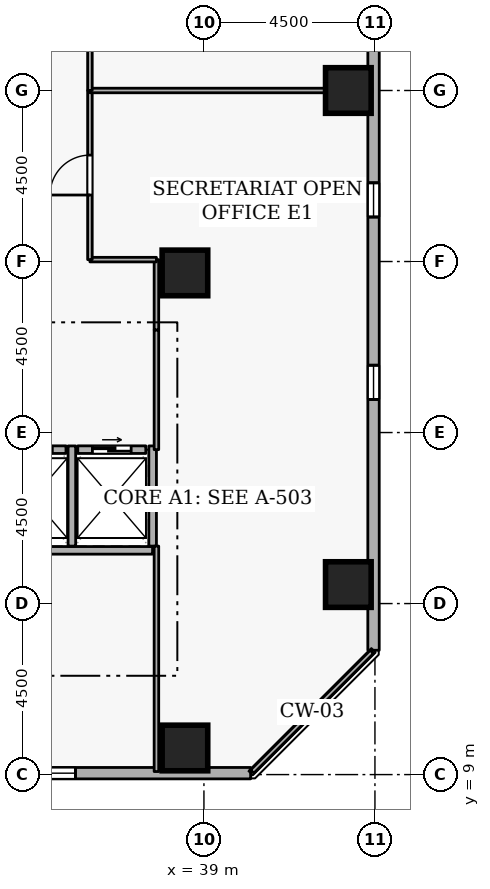
"""IFC4 building model, lengths in metres.
Left out: names, types, materials, properties, quantities, classifications, styles, units other than length and angle.
Written with IfcOpenShell. Run it as: python <this file> out.ifc"""

import sys

from ifc_helpers import new_model, si_unit, direction, frame, frame_2d, origin, origin_2d, place, context, subcontext, project, spatial, rectangle, extrude, element, fill, save


model = new_model("IFC4")
c1 = context("Model", 3, precision=1e-05, world=origin(), true_north=direction((0.0, 1.0)))
c2 = subcontext(c1, "Body", "Model", "MODEL_VIEW")
j1 = project(units=[si_unit("LENGTHUNIT", "METRE"), si_unit("PLANEANGLEUNIT", "RADIAN")], contexts=[c1])
p1 = place(None, origin())
s1 = spatial("IfcSite", under=j1, at=p1, CompositionType="ELEMENT")
p2 = place(p1, origin())
s2 = spatial("IfcBuilding", under=s1, at=p2, CompositionType="ELEMENT")
p3 = place(p2, frame((0.0, 0.0, 108.9)))
s3 = spatial("IfcBuildingStorey", under=s2, at=p3, CompositionType="ELEMENT", Elevation=108.9)
for number, where, z_axis, x_axis in (
    (1, (38.5, 9.7, 0.0), (0.0, 0.0, 1.0), (1.0, 0.0, 0.0)),
    (2, (42.8, 14.0, 0.0), (0.0, 0.0, 1.0), (1.0, 0.0, 0.0)),
    (3, (42.8, 27.0, 0.0), (0.0, 0.0, 1.0), (1.0, 0.0, 0.0)),
    (4, (38.5, 22.2, 0.0), (0.0, 0.0, 1.0), (1.0, 0.0, 0.0)),
):
    element("IfcColumn", number, at=place(p3, frame(where, z_axis=z_axis, x_axis=x_axis)), inside=s3, PredefinedType="COLUMN", context=c2, shape_type="SweptSolid", body=[
        extrude(rectangle(XDim=1.2, YDim=1.2, at=origin_2d()), origin(), (0.0, 0.0, 1.0), 3.6),
    ])
p4 = place(p3, frame((4.119, 9.035, 0.0), z_axis=(0.0, 0.0, 1.0), x_axis=(0.999999998537, 5.4088042e-05, 0.0)))
e5 = element("IfcWall", 5, at=p4, inside=s3, PredefinedType="STANDARD", context=c2, shape_type="SweptSolid", body=[
    extrude(rectangle(XDim=36.11, YDim=0.3, at=frame_2d((18.055, 0.0))), origin(), (0.0, 0.0, 1.0), 2.7),
])
p5 = place(p4, frame((1.8, 0.0, 0.72)))
e6 = element("IfcOpeningElement", 6, at=p5, cuts=e5, PredefinedType="OPENING", context=c2, shape_type="SweptSolid", body=[
    extrude(rectangle(XDim=0.9, YDim=1.75, at=frame_2d((0.45, 0.875))), frame((0.0, 0.16, 0.0), z_axis=(0.0, -1.0, 0.0), x_axis=(1.0, 0.0, 0.0)), (0.0, 0.0, 1.0), 0.32),
])
p6 = place(p4, frame((11.4, 0.0, 0.72)))
e7 = element("IfcOpeningElement", 7, at=p6, cuts=e5, PredefinedType="OPENING", context=c2, shape_type="SweptSolid", body=[
    extrude(rectangle(XDim=0.9, YDim=1.75, at=frame_2d((0.45, 0.875))), frame((0.0, 0.16, 0.0), z_axis=(0.0, -1.0, 0.0), x_axis=(1.0, 0.0, 0.0)), (0.0, 0.0, 1.0), 0.32),
])
p7 = place(p4, frame((16.2, 0.0, 0.72)))
e8 = element("IfcOpeningElement", 8, at=p7, cuts=e5, PredefinedType="OPENING", context=c2, shape_type="SweptSolid", body=[
    extrude(rectangle(XDim=0.9, YDim=1.75, at=frame_2d((0.45, 0.875))), frame((0.0, 0.16, 0.0), z_axis=(0.0, -1.0, 0.0), x_axis=(1.0, 0.0, 0.0)), (0.0, 0.0, 1.0), 0.32),
])
p8 = place(p4, frame((25.8, 0.0, 0.72)))
e9 = element("IfcOpeningElement", 9, at=p8, cuts=e5, PredefinedType="OPENING", context=c2, shape_type="SweptSolid", body=[
    extrude(rectangle(XDim=0.9, YDim=1.75, at=frame_2d((0.45, 0.875))), frame((0.0, 0.16, 0.0), z_axis=(0.0, -1.0, 0.0), x_axis=(1.0, 0.0, 0.0)), (0.0, 0.0, 1.0), 0.32),
])
p9 = place(p4, frame((30.6, 0.0, 0.72)))
e10 = element("IfcOpeningElement", 10, at=p9, cuts=e5, PredefinedType="OPENING", context=c2, shape_type="SweptSolid", body=[
    extrude(rectangle(XDim=0.9, YDim=1.75, at=frame_2d((0.45, 0.875))), frame((0.0, 0.16, 0.0), z_axis=(0.0, -1.0, 0.0), x_axis=(1.0, 0.0, 0.0)), (0.0, 0.0, 1.0), 0.32),
])
p10 = place(p3, frame((43.463, 12.271, 0.0), z_axis=(0.0, 0.0, 1.0), x_axis=(5.4088042e-05, 0.999999998537, 0.0)))
e11 = element("IfcWall", 11, at=p10, inside=s3, PredefinedType="STANDARD", context=c2, shape_type="SweptSolid", body=[
    extrude(rectangle(XDim=36.11, YDim=0.3, at=frame_2d((18.055, 0.0))), origin(), (0.0, 0.0, 1.0), 2.7),
])
p11 = place(p10, frame((6.6, 0.0, 0.72)))
e12 = element("IfcOpeningElement", 12, at=p11, cuts=e11, PredefinedType="OPENING", context=c2, shape_type="SweptSolid", body=[
    extrude(rectangle(XDim=0.9, YDim=1.75, at=frame_2d((0.45, 0.875))), frame((0.0, 0.16, 0.0), z_axis=(0.0, -1.0, 0.0), x_axis=(1.0, 0.0, 0.0)), (0.0, 0.0, 1.0), 0.32),
])
p12 = place(p10, frame((11.4, 0.0, 0.72)))
e13 = element("IfcOpeningElement", 13, at=p12, cuts=e11, PredefinedType="OPENING", context=c2, shape_type="SweptSolid", body=[
    extrude(rectangle(XDim=0.9, YDim=1.75, at=frame_2d((0.45, 0.875))), frame((0.0, 0.16, 0.0), z_axis=(0.0, -1.0, 0.0), x_axis=(1.0, 0.0, 0.0)), (0.0, 0.0, 1.0), 0.32),
])
p13 = place(p10, frame((16.2, 0.0, 0.72)))
e14 = element("IfcOpeningElement", 14, at=p13, cuts=e11, PredefinedType="OPENING", context=c2, shape_type="SweptSolid", body=[
    extrude(rectangle(XDim=0.9, YDim=1.75, at=frame_2d((0.45, 0.875))), frame((0.0, 0.16, 0.0), z_axis=(0.0, -1.0, 0.0), x_axis=(1.0, 0.0, 0.0)), (0.0, 0.0, 1.0), 0.32),
])
p14 = place(p10, frame((21.0, 0.0, 0.72)))
e15 = element("IfcOpeningElement", 15, at=p14, cuts=e11, PredefinedType="OPENING", context=c2, shape_type="SweptSolid", body=[
    extrude(rectangle(XDim=0.9, YDim=1.75, at=frame_2d((0.45, 0.875))), frame((0.0, 0.16, 0.0), z_axis=(0.0, -1.0, 0.0), x_axis=(1.0, 0.0, 0.0)), (0.0, 0.0, 1.0), 0.32),
])
p15 = place(p10, frame((30.6, 0.0, 0.72)))
e16 = element("IfcOpeningElement", 16, at=p15, cuts=e11, PredefinedType="OPENING", context=c2, shape_type="SweptSolid", body=[
    extrude(rectangle(XDim=0.9, YDim=1.75, at=frame_2d((0.45, 0.875))), frame((0.0, 0.16, 0.0), z_axis=(0.0, -1.0, 0.0), x_axis=(1.0, 0.0, 0.0)), (0.0, 0.0, 1.0), 0.32),
])
p16 = place(p3, frame((33.63, 17.55, 0.0), z_axis=(0.0, 0.0, 1.0), x_axis=(1.0, 0.0, 0.0)))
e17 = element("IfcWall", 17, at=p16, inside=s3, PredefinedType="STANDARD", context=c2, shape_type="SweptSolid", body=[
    extrude(rectangle(XDim=1.74, YDim=0.2, at=frame_2d((0.87, 0.0))), origin(), (0.0, 0.0, 1.0), 3.34),
])
p17 = place(p16, frame((0.36, 0.0, 0.0)))
e18 = element("IfcOpeningElement", 18, at=p17, cuts=e17, PredefinedType="OPENING", context=c2, shape_type="SweptSolid", body=[
    extrude(rectangle(XDim=1.02, YDim=2.06, at=frame_2d((0.51, 1.03))), frame((0.0, 0.11, 0.0), z_axis=(0.0, -1.0, 0.0), x_axis=(1.0, 0.0, 0.0)), (0.0, 0.0, 1.0), 0.22),
])
p18 = place(p3, frame((35.68, 17.55, 0.0), z_axis=(0.0, 0.0, 1.0), x_axis=(1.0, 0.0, 0.0)))
e19 = element("IfcWall", 19, at=p18, inside=s3, PredefinedType="STANDARD", context=c2, shape_type="SweptSolid", body=[
    extrude(rectangle(XDim=1.79, YDim=0.2, at=frame_2d((0.895, 0.0))), origin(), (0.0, 0.0, 1.0), 3.34),
])
p19 = place(p18, frame((0.385, 0.0, 0.0)))
e20 = element("IfcOpeningElement", 20, at=p19, cuts=e19, PredefinedType="OPENING", context=c2, shape_type="SweptSolid", body=[
    extrude(rectangle(XDim=1.02, YDim=2.06, at=frame_2d((0.51, 1.03))), frame((0.0, 0.11, 0.0), z_axis=(0.0, -1.0, 0.0), x_axis=(1.0, 0.0, 0.0)), (0.0, 0.0, 1.0), 0.22),
])
p20 = place(p3, frame((33.452, 14.9, 0.0), z_axis=(0.0, 0.0, 1.0), x_axis=(1.0, 0.0, 0.0)))
e21 = element("IfcWall", 21, at=p20, inside=s3, PredefinedType="STANDARD", context=c2, shape_type="SweptSolid", body=[
    extrude(rectangle(XDim=4.196, YDim=0.2, at=frame_2d((2.098, 0.0))), origin(), (0.0, 0.0, 1.0), 3.34),
])
for number, where, z_axis, x_axis in (
    (22, (35.525, 15.012, 0.0), (0.0, 0.0, 1.0), (0.0, 1.0, 0.0)),
    (23, (37.65, 15.012, 0.0), (0.0, 0.0, 1.0), (0.0, 1.0, 0.0)),
):
    element("IfcWall", number, at=place(p3, frame(where, z_axis=z_axis, x_axis=x_axis)), inside=s3, PredefinedType="STANDARD", context=c2, shape_type="SweptSolid", body=[
        extrude(rectangle(XDim=2.636, YDim=0.2, at=frame_2d((1.318, 0.0))), origin(), (0.0, 0.0, 1.0), 3.34),
    ])
p21 = place(p3, frame((37.75, 17.55, 0.0), z_axis=(0.0, 0.0, 1.0), x_axis=(0.0, 1.0, 0.0)))
e24 = element("IfcWall", 24, at=p21, inside=s3, PredefinedType="PARTITIONING", context=c2, shape_type="SweptSolid", body=[
    extrude(rectangle(XDim=3.15, YDim=0.12, at=frame_2d((1.575, 0.0))), origin(), (0.0, 0.0, 1.0), 3.34),
])
p22 = place(p3, frame((37.75, 20.7, 0.0), z_axis=(0.0, 0.0, 1.0), x_axis=(0.0, 1.0, 0.0)))
e25 = element("IfcWall", 25, at=p22, inside=s3, PredefinedType="PARTITIONING", context=c2, shape_type="SweptSolid", body=[
    extrude(rectangle(XDim=1.85, YDim=0.12, at=frame_2d((0.925, 0.0))), origin(), (0.0, 0.0, 1.0), 3.34),
])
p23 = place(p3, frame((37.75, 22.55, 0.0), z_axis=(0.0, 0.0, 1.0), x_axis=(-1.0, 0.0, 0.0)))
e26 = element("IfcWall", 26, at=p23, inside=s3, PredefinedType="PARTITIONING", context=c2, shape_type="SweptSolid", body=[
    extrude(rectangle(XDim=1.75, YDim=0.12, at=frame_2d((0.875, 0.0))), origin(), (0.0, 0.0, 1.0), 3.34),
])
p24 = place(p3, frame((36.0, 22.55, 0.0), z_axis=(0.0, 0.0, 1.0), x_axis=(0.0, 1.0, 0.0)))
e27 = element("IfcWall", 27, at=p24, inside=s3, PredefinedType="PARTITIONING", context=c2, shape_type="SweptSolid", body=[
    extrude(rectangle(XDim=4.45, YDim=0.12, at=frame_2d((2.225, 0.0))), origin(), (0.0, 0.0, 1.0), 3.34),
])
p25 = place(p24, frame((1.7, 0.0, 0.0)))
e28 = element("IfcOpeningElement", 28, at=p25, cuts=e27, PredefinedType="OPENING", context=c2, shape_type="SweptSolid", body=[
    extrude(rectangle(XDim=1.05, YDim=2.1, at=frame_2d((0.525, 1.05))), frame((0.0, 0.07, 0.0), z_axis=(0.0, -1.0, 0.0), x_axis=(1.0, 0.0, 0.0)), (0.0, 0.0, 1.0), 0.14),
])
p26 = place(p3, frame((36.0, 27.0, 0.0), z_axis=(0.0, 0.0, 1.0), x_axis=(1.0, 0.0, 0.0)))
e29 = element("IfcWall", 29, at=p26, inside=s3, PredefinedType="PARTITIONING", context=c2, shape_type="SweptSolid", body=[
    extrude(rectangle(XDim=7.42, YDim=0.12, at=frame_2d((3.71, 0.0))), origin(), (0.0, 0.0, 1.0), 2.882),
])
p27 = place(p3, frame((43.42, 12.229, 0.0), z_axis=(0.0, 0.0, 1.0), x_axis=(-0.707106781187, -0.707106781187, 0.0)))
e30 = element("IfcWall", 30, at=p27, inside=s3, PredefinedType="PARTITIONING", context=c2, shape_type="SweptSolid", body=[
    extrude(rectangle(XDim=4.454, YDim=0.12, at=frame_2d((2.227, 0.0))), origin(), (0.0, 0.0, 1.0), 3.34),
])
p28 = place(p3, frame((37.75, 9.08, 0.0), z_axis=(0.0, 0.0, 1.0), x_axis=(0.0, 1.0, 0.0)))
e31 = element("IfcWall", 31, at=p28, inside=s3, PredefinedType="PARTITIONING", context=c2, shape_type="SweptSolid", body=[
    extrude(rectangle(XDim=5.932, YDim=0.12, at=frame_2d((2.966, 0.0))), origin(), (0.0, 0.0, 1.0), 3.34),
])
p29 = place(p3, frame((36.0, 27.0, 0.0), z_axis=(0.0, 0.0, 1.0), x_axis=(0.0, 1.0, 0.0)))
e32 = element("IfcWall", 32, at=p29, inside=s3, PredefinedType="PARTITIONING", context=c2, shape_type="SweptSolid", body=[
    extrude(rectangle(XDim=3.15, YDim=0.12, at=frame_2d((1.575, 0.0))), origin(), (0.0, 0.0, 1.0), 3.34),
])
p30 = place(p29, frame((1.1, 0.0, 0.0)))
e33 = element("IfcOpeningElement", 33, at=p30, cuts=e32, PredefinedType="OPENING", context=c2, shape_type="SweptSolid", body=[
    extrude(rectangle(XDim=0.95, YDim=2.1, at=frame_2d((0.475, 1.05))), frame((0.0, 0.07, 0.0), z_axis=(0.0, -1.0, 0.0), x_axis=(1.0, 0.0, 0.0)), (0.0, 0.0, 1.0), 0.14),
])
p31 = place(p9, origin())
e34 = element("IfcWindow", 34, at=p31, inside=s3, PartitioningType="SINGLE_PANEL", PredefinedType="WINDOW", context=c2, shape_type="SweptSolid", body=[
    extrude(rectangle(XDim=0.9, YDim=1.75, at=frame_2d((0.45, 0.875))), frame((0.0, 0.03, 0.0), z_axis=(0.0, -1.0, 0.0), x_axis=(1.0, 0.0, 0.0)), (0.0, 0.0, 1.0), 0.06),
])
fill(e10, e34)
p32 = place(p11, origin())
e35 = element("IfcWindow", 35, at=p32, inside=s3, PartitioningType="SINGLE_PANEL", PredefinedType="WINDOW", context=c2, shape_type="SweptSolid", body=[
    extrude(rectangle(XDim=0.9, YDim=1.75, at=frame_2d((0.45, 0.875))), frame((0.0, 0.03, 0.0), z_axis=(0.0, -1.0, 0.0), x_axis=(1.0, 0.0, 0.0)), (0.0, 0.0, 1.0), 0.06),
])
fill(e12, e35)
p33 = place(p12, origin())
e36 = element("IfcWindow", 36, at=p33, inside=s3, PartitioningType="SINGLE_PANEL", PredefinedType="WINDOW", context=c2, shape_type="SweptSolid", body=[
    extrude(rectangle(XDim=0.9, YDim=1.75, at=frame_2d((0.45, 0.875))), frame((0.0, 0.03, 0.0), z_axis=(0.0, -1.0, 0.0), x_axis=(1.0, 0.0, 0.0)), (0.0, 0.0, 1.0), 0.06),
])
fill(e13, e36)
p34 = place(p17, origin())
e37 = element("IfcDoor", 37, at=p34, inside=s3, OperationType="SLIDING_TO_LEFT", PredefinedType="DOOR", context=c2, shape_type="SweptSolid", body=[
    extrude(rectangle(XDim=1.02, YDim=2.06, at=frame_2d((0.51, 1.03))), frame((0.0, 0.025, 0.0), z_axis=(0.0, -1.0, 0.0), x_axis=(1.0, 0.0, 0.0)), (0.0, 0.0, 1.0), 0.05),
])
fill(e18, e37)
p35 = place(p19, origin())
e38 = element("IfcDoor", 38, at=p35, inside=s3, OperationType="SLIDING_TO_LEFT", PredefinedType="DOOR", context=c2, shape_type="SweptSolid", body=[
    extrude(rectangle(XDim=1.02, YDim=2.06, at=frame_2d((0.51, 1.03))), frame((0.0, 0.025, 0.0), z_axis=(0.0, -1.0, 0.0), x_axis=(1.0, 0.0, 0.0)), (0.0, 0.0, 1.0), 0.05),
])
fill(e20, e38)
p36 = place(p25, origin())
e39 = element("IfcDoor", 39, at=p36, inside=s3, OperationType="SINGLE_SWING_LEFT", PredefinedType="DOOR", context=c2, shape_type="SweptSolid", body=[
    extrude(rectangle(XDim=1.05, YDim=2.1, at=frame_2d((0.525, 1.05))), frame((0.0, 0.025, 0.0), z_axis=(0.0, -1.0, 0.0), x_axis=(1.0, 0.0, 0.0)), (0.0, 0.0, 1.0), 0.05),
])
fill(e28, e39)
save(model, sys.argv[1])
